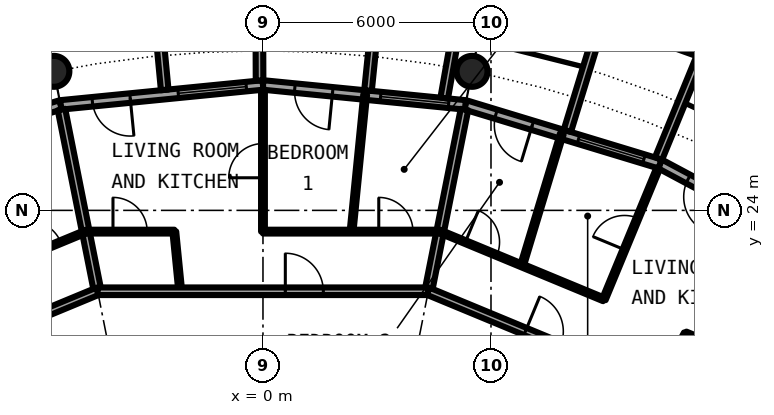
"""IFC4 building model, lengths in metres.
Left out: names, types, materials, properties, quantities, classifications, styles, units other than length and angle.
Written with IfcOpenShell. Run it as: python <this file> out.ifc"""

import sys

from ifc_helpers import new_model, si_unit, direction, frame, frame_2d, origin, origin_2d, place, context, subcontext, project, spatial, rectangle, circle, hollow_circle, extrude, element, fill, save


model = new_model("IFC4")
c1 = context("Model", 3, precision=1e-05, world=origin(), true_north=direction((0.0, 1.0)))
c2 = subcontext(c1, "Body", "Model", "MODEL_VIEW")
j1 = project(units=[si_unit("LENGTHUNIT", "METRE"), si_unit("PLANEANGLEUNIT", "RADIAN")], contexts=[c1])
p1 = place(None, origin())
s1 = spatial("IfcSite", under=j1, at=p1, CompositionType="ELEMENT")
p2 = place(p1, origin())
s2 = spatial("IfcBuilding", under=s1, at=p2, CompositionType="ELEMENT")
p3 = place(p2, frame((0.0, 0.0, 167.7)))
s3 = spatial("IfcBuildingStorey", under=s2, at=p3, CompositionType="ELEMENT", Elevation=167.7)
for number, where, z_axis, x_axis in (
    (1, (5.501, 27.658, 0.0), (0.0, 0.0, 1.0), (1.0, 0.0, 0.0)),
    (2, (-5.501, 27.658, 0.0), (0.0, 0.0, 1.0), (1.0, 0.0, 0.0)),
):
    element("IfcColumn", number, at=place(p3, frame(where, z_axis=z_axis, x_axis=x_axis)), inside=s3, PredefinedType="COLUMN", context=c2, shape_type="SweptSolid", body=[
        extrude(hollow_circle(Radius=0.406, WallThickness=0.04, at=origin_2d()), origin(), (0.0, 0.0, 1.0), 3.05),
    ])
p4 = place(p3, frame((15.167, 22.699, 0.0), z_axis=(0.0, 0.0, 1.0), x_axis=(-0.881915646801, 0.471407246368, 0.0)))
e3 = element("IfcWall", 3, at=p4, inside=s3, PredefinedType="SOLIDWALL", context=c2, shape_type="SweptSolid", body=[
    extrude(rectangle(XDim=5.352, YDim=0.25, at=frame_2d((2.676, 0.0))), origin(), (0.0, 0.0, 1.0), 2.7),
])
p5 = place(p4, frame((0.441, 0.0, 0.3)))
e4 = element("IfcOpeningElement", 4, at=p5, cuts=e3, PredefinedType="OPENING", context=c2, shape_type="SweptSolid", body=[
    extrude(rectangle(XDim=1.8, YDim=2.1, at=frame_2d((0.9, 1.05))), frame((0.0, 0.135, 0.0), z_axis=(0.0, -1.0, 0.0), x_axis=(1.0, 0.0, 0.0)), (0.0, 0.0, 1.0), 0.27),
])
p6 = place(p4, frame((3.51, 0.0, 0.0)))
e5 = element("IfcOpeningElement", 5, at=p6, cuts=e3, PredefinedType="OPENING", context=c2, shape_type="SweptSolid", body=[
    extrude(rectangle(XDim=1.0, YDim=2.2, at=frame_2d((0.5, 1.1))), frame((0.0, 0.135, 0.0), z_axis=(0.0, -1.0, 0.0), x_axis=(1.0, 0.0, 0.0)), (0.0, 0.0, 1.0), 0.27),
])
p7 = place(p3, frame((10.447, 25.222, 0.0), z_axis=(0.0, 0.0, 1.0), x_axis=(-0.956965678721, 0.290201119486, 0.0)))
e6 = element("IfcWall", 6, at=p7, inside=s3, PredefinedType="SOLIDWALL", context=c2, shape_type="SweptSolid", body=[
    extrude(rectangle(XDim=5.351, YDim=0.25, at=frame_2d((2.676, 0.0))), origin(), (0.0, 0.0, 1.0), 2.7),
])
p8 = place(p7, frame((0.441, 0.0, 0.3)))
e7 = element("IfcOpeningElement", 7, at=p8, cuts=e6, PredefinedType="OPENING", context=c2, shape_type="SweptSolid", body=[
    extrude(rectangle(XDim=1.8, YDim=2.1, at=frame_2d((0.9, 1.05))), frame((0.0, 0.135, 0.0), z_axis=(0.0, -1.0, 0.0), x_axis=(1.0, 0.0, 0.0)), (0.0, 0.0, 1.0), 0.27),
])
p9 = place(p7, frame((3.51, 0.0, 0.0)))
e8 = element("IfcOpeningElement", 8, at=p9, cuts=e6, PredefinedType="OPENING", context=c2, shape_type="SweptSolid", body=[
    extrude(rectangle(XDim=1.0, YDim=2.2, at=frame_2d((0.5, 1.1))), frame((0.0, 0.135, 0.0), z_axis=(0.0, -1.0, 0.0), x_axis=(1.0, 0.0, 0.0)), (0.0, 0.0, 1.0), 0.27),
])
p10 = place(p3, frame((11.638, 28.084, -0.03), z_axis=(0.0, 0.0, 1.0), x_axis=(-0.941461077774, 0.337121697664, 0.0)))
e9 = element("IfcWall", 9, at=p10, inside=s3, PredefinedType="SOLIDWALL", context=c2, shape_type="SweptSolid", body=[
    extrude(rectangle(XDim=2.993, YDim=0.2, at=frame_2d((1.497, 0.0))), origin(), (0.0, 0.0, 1.0), 2.73),
])
p11 = place(p10, frame((0.457, 0.0, 0.33)))
e10 = element("IfcOpeningElement", 10, at=p11, cuts=e9, PredefinedType="OPENING", context=c2, shape_type="SweptSolid", body=[
    extrude(circle(Radius=1.04, at=frame_2d((1.04, 1.04))), frame((0.0, 0.11, 0.0), z_axis=(0.0, -1.0, 0.0), x_axis=(1.0, 0.0, 0.0)), (0.0, 0.0, 1.0), 0.22),
])
p12 = place(p3, frame((10.409, 25.364, -0.03), z_axis=(0.0, 0.0, 1.0), x_axis=(0.379509886562, 0.925187681501, 0.0)))
e11 = element("IfcWall", 11, at=p12, inside=s3, PredefinedType="SOLIDWALL", context=c2, shape_type="SweptSolid", body=[
    extrude(rectangle(XDim=2.883, YDim=0.2, at=frame_2d((1.441, 0.0))), origin(), (0.0, 0.0, 1.0), 2.73),
])
p13 = place(p3, frame((8.009, 26.092, -0.03), z_axis=(0.0, 0.0, 1.0), x_axis=(0.293406695073, 0.955987715029, 0.0)))
e12 = element("IfcWall", 12, at=p13, inside=s3, PredefinedType="SOLIDWALL", context=c2, shape_type="SweptSolid", body=[
    extrude(rectangle(XDim=3.006, YDim=0.2, at=frame_2d((1.503, 0.0))), origin(), (0.0, 0.0, 1.0), 2.73),
])
p14 = place(p3, frame((5.326, 26.775, 0.0), z_axis=(0.0, 0.0, 1.0), x_axis=(-0.995173996315, 0.098126026407, 0.0)))
e13 = element("IfcWall", 13, at=p14, inside=s3, PredefinedType="SOLIDWALL", context=c2, shape_type="SweptSolid", body=[
    extrude(rectangle(XDim=5.352, YDim=0.25, at=frame_2d((2.676, 0.0))), origin(), (0.0, 0.0, 1.0), 2.7),
])
p15 = place(p14, frame((0.441, 0.0, 0.3)))
e14 = element("IfcOpeningElement", 14, at=p15, cuts=e13, PredefinedType="OPENING", context=c2, shape_type="SweptSolid", body=[
    extrude(rectangle(XDim=1.8, YDim=2.1, at=frame_2d((0.9, 1.05))), frame((0.0, 0.135, 0.0), z_axis=(0.0, -1.0, 0.0), x_axis=(1.0, 0.0, 0.0)), (0.0, 0.0, 1.0), 0.27),
])
p16 = place(p14, frame((3.51, 0.0, 0.0)))
e15 = element("IfcOpeningElement", 15, at=p16, cuts=e13, PredefinedType="OPENING", context=c2, shape_type="SweptSolid", body=[
    extrude(rectangle(XDim=1.0, YDim=2.2, at=frame_2d((0.5, 1.1))), frame((0.0, 0.135, 0.0), z_axis=(0.0, -1.0, 0.0), x_axis=(1.0, 0.0, 0.0)), (0.0, 0.0, 1.0), 0.27),
])
p17 = place(p3, frame((4.769, 26.956, -0.03), z_axis=(0.0, 0.0, 1.0), x_axis=(0.174056778901, 0.984735618183, 0.0)))
e16 = element("IfcWall", 16, at=p17, inside=s3, PredefinedType="SOLIDWALL", context=c2, shape_type="SweptSolid", body=[
    extrude(rectangle(XDim=2.925, YDim=0.2, at=frame_2d((1.462, 0.0))), origin(), (0.0, 0.0, 1.0), 2.73),
])
p18 = place(p3, frame((2.764, 27.153, -0.03), z_axis=(0.0, 0.0, 1.0), x_axis=(0.101505487237, 0.994834979311, 0.0)))
e17 = element("IfcWall", 17, at=p18, inside=s3, PredefinedType="SOLIDWALL", context=c2, shape_type="SweptSolid", body=[
    extrude(rectangle(XDim=3.007, YDim=0.2, at=frame_2d((1.503, 0.0))), origin(), (0.0, 0.0, 1.0), 2.73),
])
p19 = place(p3, frame((0.0, 27.3, 0.0), z_axis=(0.0, 0.0, 1.0), x_axis=(-0.995173996315, -0.098126026407, 0.0)))
e18 = element("IfcWall", 18, at=p19, inside=s3, PredefinedType="SOLIDWALL", context=c2, shape_type="SweptSolid", body=[
    extrude(rectangle(XDim=5.352, YDim=0.25, at=frame_2d((2.676, 0.0))), origin(), (0.0, 0.0, 1.0), 2.7),
])
p20 = place(p19, frame((0.441, 0.0, 0.3)))
e19 = element("IfcOpeningElement", 19, at=p20, cuts=e18, PredefinedType="OPENING", context=c2, shape_type="SweptSolid", body=[
    extrude(rectangle(XDim=1.8, YDim=2.1, at=frame_2d((0.9, 1.05))), frame((0.0, 0.135, 0.0), z_axis=(0.0, -1.0, 0.0), x_axis=(1.0, 0.0, 0.0)), (0.0, 0.0, 1.0), 0.27),
])
p21 = place(p19, frame((3.51, 0.0, 0.0)))
e20 = element("IfcOpeningElement", 20, at=p21, cuts=e18, PredefinedType="OPENING", context=c2, shape_type="SweptSolid", body=[
    extrude(rectangle(XDim=1.0, YDim=2.2, at=frame_2d((0.5, 1.1))), frame((0.0, 0.135, 0.0), z_axis=(0.0, -1.0, 0.0), x_axis=(1.0, 0.0, 0.0)), (0.0, 0.0, 1.0), 0.27),
])
p22 = place(p3, frame((-0.09, 27.417, -0.03), z_axis=(0.0, 0.0, 1.0), x_axis=(-0.00347308367, 0.999993968827, 0.0)))
e21 = element("IfcWall", 21, at=p22, inside=s3, PredefinedType="SOLIDWALL", context=c2, shape_type="SweptSolid", body=[
    extrude(rectangle(XDim=2.882, YDim=0.2, at=frame_2d((1.441, 0.0))), origin(), (0.0, 0.0, 1.0), 2.73),
])
p23 = place(p3, frame((-2.586, 27.171, -0.03), z_axis=(0.0, 0.0, 1.0), x_axis=(-0.094548432284, 0.995520262954, 0.0)))
e22 = element("IfcWall", 22, at=p23, inside=s3, PredefinedType="SOLIDWALL", context=c2, shape_type="SweptSolid", body=[
    extrude(rectangle(XDim=3.006, YDim=0.2, at=frame_2d((1.503, 0.0))), origin(), (0.0, 0.0, 1.0), 2.73),
])
p24 = place(p3, frame((-5.326, 26.775, 0.0), z_axis=(0.0, 0.0, 1.0), x_axis=(-0.956965678721, -0.290201119486, 0.0)))
e23 = element("IfcWall", 23, at=p24, inside=s3, PredefinedType="SOLIDWALL", context=c2, shape_type="SweptSolid", body=[
    extrude(rectangle(XDim=5.351, YDim=0.25, at=frame_2d((2.676, 0.0))), origin(), (0.0, 0.0, 1.0), 2.7),
])
p25 = place(p24, frame((0.441, 0.0, 0.3)))
e24 = element("IfcOpeningElement", 24, at=p25, cuts=e23, PredefinedType="OPENING", context=c2, shape_type="SweptSolid", body=[
    extrude(rectangle(XDim=1.8, YDim=2.1, at=frame_2d((0.9, 1.05))), frame((0.0, 0.135, 0.0), z_axis=(0.0, -1.0, 0.0), x_axis=(1.0, 0.0, 0.0)), (0.0, 0.0, 1.0), 0.27),
])
p26 = place(p24, frame((3.51, 0.0, 0.0)))
e25 = element("IfcOpeningElement", 25, at=p26, cuts=e23, PredefinedType="OPENING", context=c2, shape_type="SweptSolid", body=[
    extrude(rectangle(XDim=1.0, YDim=2.2, at=frame_2d((0.5, 1.1))), frame((0.0, 0.135, 0.0), z_axis=(0.0, -1.0, 0.0), x_axis=(1.0, 0.0, 0.0)), (0.0, 0.0, 1.0), 0.27),
])
p27 = place(p3, frame((10.38, 19.374, 0.0), z_axis=(0.0, 0.0, 1.0), x_axis=(0.472002235476, 0.881597351236, 0.0)))
e26 = element("IfcWall", 26, at=p27, inside=s3, PredefinedType="PARTITIONING", context=c2, shape_type="SweptSolid", body=[
    extrude(rectangle(XDim=1.577, YDim=0.1, at=frame_2d((0.788, 0.0))), origin(), (0.0, 0.0, 1.0), 2.7),
])
p28 = place(p3, frame((-5.302, 26.653, 0.0), z_axis=(0.0, 0.0, 1.0), x_axis=(0.195075825861, -0.980788163756, 0.0)))
e27 = element("IfcWall", 27, at=p28, inside=s3, PredefinedType="PARTITIONING", context=c2, shape_type="SweptSolid", body=[
    extrude(rectangle(XDim=4.875, YDim=0.2, at=frame_2d((2.438, 0.0))), origin(), (0.0, 0.0, 1.0), 2.7),
])
p29 = place(p3, frame((-2.333, 23.441, 0.0), z_axis=(0.0, 0.0, 1.0), x_axis=(0.098951748623, -0.995092232632, 0.0)))
e28 = element("IfcWall", 28, at=p29, inside=s3, PredefinedType="PARTITIONING", context=c2, shape_type="SweptSolid", body=[
    extrude(rectangle(XDim=1.577, YDim=0.1, at=frame_2d((0.788, 0.0))), origin(), (0.0, 0.0, 1.0), 2.7),
])
p30 = place(p3, frame((0.0, 23.441, 0.0), z_axis=(0.0, 0.0, 1.0), x_axis=(0.0, 1.0, 0.0)))
e29 = element("IfcWall", 29, at=p30, inside=s3, PredefinedType="PARTITIONING", context=c2, shape_type="SweptSolid", body=[
    extrude(rectangle(XDim=3.734, YDim=0.1, at=frame_2d((1.867, 0.0))), origin(), (0.0, 0.0, 1.0), 2.7),
])
p31 = place(p30, frame((1.417, 0.0, 0.0)))
e30 = element("IfcOpeningElement", 30, at=p31, cuts=e29, PredefinedType="OPENING", context=c2, shape_type="SweptSolid", body=[
    extrude(rectangle(XDim=0.9, YDim=2.3, at=frame_2d((0.45, 1.15))), frame((0.0, 0.06, 0.0), z_axis=(0.0, -1.0, 0.0), x_axis=(1.0, 0.0, 0.0)), (0.0, 0.0, 1.0), 0.12),
])
p32 = place(p3, frame((2.331, 23.441, 0.0), z_axis=(0.0, 0.0, 1.0), x_axis=(0.098902534616, 0.995097125233, 0.0)))
e31 = element("IfcWall", 31, at=p32, inside=s3, PredefinedType="PARTITIONING", context=c2, shape_type="SweptSolid", body=[
    extrude(rectangle(XDim=3.619, YDim=0.1, at=frame_2d((1.81, 0.0))), origin(), (0.0, 0.0, 1.0), 2.7),
])
p33 = place(p3, frame((4.351, 21.872, 0.0), z_axis=(0.0, 0.0, 1.0), x_axis=(0.195075825861, 0.980788163756, 0.0)))
e32 = element("IfcWall", 32, at=p33, inside=s3, PredefinedType="PARTITIONING", context=c2, shape_type="SweptSolid", body=[
    extrude(rectangle(XDim=4.875, YDim=0.2, at=frame_2d((2.438, 0.0))), origin(), (0.0, 0.0, 1.0), 2.7),
])
p34 = place(p3, frame((6.817, 22.549, 0.0), z_axis=(0.0, 0.0, 1.0), x_axis=(0.289439829793, 0.957196210256, 0.0)))
e33 = element("IfcWall", 33, at=p34, inside=s3, PredefinedType="PARTITIONING", context=c2, shape_type="SweptSolid", body=[
    extrude(rectangle(XDim=3.618, YDim=0.1, at=frame_2d((1.809, 0.0))), origin(), (0.0, 0.0, 1.0), 2.7),
])
p35 = place(p3, frame((8.97, 21.657, 0.0), z_axis=(0.0, 0.0, 1.0), x_axis=(0.382761856702, 0.923847044188, 0.0)))
e34 = element("IfcWall", 34, at=p35, inside=s3, PredefinedType="PARTITIONING", context=c2, shape_type="SweptSolid", body=[
    extrude(rectangle(XDim=3.733, YDim=0.1, at=frame_2d((1.867, 0.0))), origin(), (0.0, 0.0, 1.0), 2.7),
])
p36 = place(p35, frame((1.417, 0.0, 0.0)))
e35 = element("IfcOpeningElement", 35, at=p36, cuts=e34, PredefinedType="OPENING", context=c2, shape_type="SweptSolid", body=[
    extrude(rectangle(XDim=0.9, YDim=2.3, at=frame_2d((0.45, 1.15))), frame((0.0, 0.06, 0.0), z_axis=(0.0, -1.0, 0.0), x_axis=(1.0, 0.0, 0.0)), (0.0, 0.0, 1.0), 0.12),
])
p37 = place(p3, frame((-12.396, 18.536, 0.0), z_axis=(0.0, 0.0, 1.0), x_axis=(0.923722518166, 0.383062278792, 0.0)))
e36 = element("IfcWall", 36, at=p37, inside=s3, PredefinedType="PARTITIONING", context=c2, shape_type="SweptSolid", body=[
    extrude(rectangle(XDim=8.709, YDim=0.2, at=frame_2d((4.354, 0.0))), origin(), (0.0, 0.0, 1.0), 2.7),
])
p38 = place(p37, frame((2.772, 0.0, 0.0)))
e37 = element("IfcOpeningElement", 37, at=p38, cuts=e36, PredefinedType="OPENING", context=c2, shape_type="SweptSolid", body=[
    extrude(rectangle(XDim=1.0, YDim=2.3, at=frame_2d((0.5, 1.15))), frame((0.0, 0.11, 0.0), z_axis=(0.0, -1.0, 0.0), x_axis=(1.0, 0.0, 0.0)), (0.0, 0.0, 1.0), 0.22),
])
p39 = place(p3, frame((-4.351, 21.872, 0.0), z_axis=(0.0, 0.0, 1.0), x_axis=(1.0, 0.0, 0.0)))
e38 = element("IfcWall", 38, at=p39, inside=s3, PredefinedType="PARTITIONING", context=c2, shape_type="SweptSolid", body=[
    extrude(rectangle(XDim=8.702, YDim=0.2, at=frame_2d((4.351, 0.0))), origin(), (0.0, 0.0, 1.0), 2.7),
])
p40 = place(p39, frame((4.939, 0.0, 0.0)))
e39 = element("IfcOpeningElement", 39, at=p40, cuts=e38, PredefinedType="OPENING", context=c2, shape_type="SweptSolid", body=[
    extrude(rectangle(XDim=1.0, YDim=2.3, at=frame_2d((0.5, 1.15))), frame((0.0, 0.11, 0.0), z_axis=(0.0, -1.0, 0.0), x_axis=(1.0, 0.0, 0.0)), (0.0, 0.0, 1.0), 0.22),
])
p41 = place(p3, frame((4.347, 21.872, 0.0), z_axis=(0.0, 0.0, 1.0), x_axis=(0.923921124994, -0.382583003792, 0.0)))
e40 = element("IfcWall", 40, at=p41, inside=s3, PredefinedType="PARTITIONING", context=c2, shape_type="SweptSolid", body=[
    extrude(rectangle(XDim=8.704, YDim=0.2, at=frame_2d((4.352, 0.0))), origin(), (0.0, 0.0, 1.0), 2.7),
])
p42 = place(p41, frame((2.767, 0.0, 0.0)))
e41 = element("IfcOpeningElement", 41, at=p42, cuts=e40, PredefinedType="OPENING", context=c2, shape_type="SweptSolid", body=[
    extrude(rectangle(XDim=1.0, YDim=2.3, at=frame_2d((0.5, 1.15))), frame((0.0, 0.11, 0.0), z_axis=(0.0, -1.0, 0.0), x_axis=(1.0, 0.0, 0.0)), (0.0, 0.0, 1.0), 0.22),
])
p43 = place(p3, frame((-6.817, 22.548, 0.0), z_axis=(0.0, 0.0, 1.0), x_axis=(0.924061443507, 0.382243964798, 0.0)))
e42 = element("IfcWall", 42, at=p43, inside=s3, PredefinedType="PARTITIONING", context=c2, shape_type="SweptSolid", body=[
    extrude(rectangle(XDim=2.333, YDim=0.1, at=frame_2d((1.167, 0.0))), origin(), (0.0, 0.0, 1.0), 2.7),
])
p44 = place(p43, frame((0.717, 0.0, 0.0)))
e43 = element("IfcOpeningElement", 43, at=p44, cuts=e42, PredefinedType="OPENING", context=c2, shape_type="SweptSolid", body=[
    extrude(rectangle(XDim=0.9, YDim=2.3, at=frame_2d((0.45, 1.15))), frame((0.0, 0.06, 0.0), z_axis=(0.0, -1.0, 0.0), x_axis=(1.0, 0.0, 0.0)), (0.0, 0.0, 1.0), 0.12),
])
p45 = place(p3, frame((-4.663, 23.441, 0.0), z_axis=(0.0, 0.0, 1.0), x_axis=(1.0, 0.0, 0.0)))
e44 = element("IfcWall", 44, at=p45, inside=s3, PredefinedType="PARTITIONING", context=c2, shape_type="SweptSolid", body=[
    extrude(rectangle(XDim=2.332, YDim=0.1, at=frame_2d((1.166, 0.0))), origin(), (0.0, 0.0, 1.0), 2.7),
])
p46 = place(p45, frame((0.716, 0.0, 0.0)))
e45 = element("IfcOpeningElement", 45, at=p46, cuts=e44, PredefinedType="OPENING", context=c2, shape_type="SweptSolid", body=[
    extrude(rectangle(XDim=0.9, YDim=2.3, at=frame_2d((0.45, 1.15))), frame((0.0, 0.06, 0.0), z_axis=(0.0, -1.0, 0.0), x_axis=(1.0, 0.0, 0.0)), (0.0, 0.0, 1.0), 0.12),
])
p47 = place(p3, frame((0.0, 23.441, 0.0), z_axis=(0.0, 0.0, 1.0), x_axis=(1.0, 0.0, 0.0)))
e46 = element("IfcWall", 46, at=p47, inside=s3, PredefinedType="PARTITIONING", context=c2, shape_type="SweptSolid", body=[
    extrude(rectangle(XDim=4.663, YDim=0.1, at=frame_2d((2.332, 0.0))), origin(), (0.0, 0.0, 1.0), 2.7),
])
p48 = place(p47, frame((3.047, 0.0, 0.0)))
e47 = element("IfcOpeningElement", 47, at=p48, cuts=e46, PredefinedType="OPENING", context=c2, shape_type="SweptSolid", body=[
    extrude(rectangle(XDim=0.9, YDim=2.3, at=frame_2d((0.45, 1.15))), frame((0.0, 0.06, 0.0), z_axis=(0.0, -1.0, 0.0), x_axis=(1.0, 0.0, 0.0)), (0.0, 0.0, 1.0), 0.12),
])
p49 = place(p3, frame((4.66, 23.441, 0.0), z_axis=(0.0, 0.0, 1.0), x_axis=(0.923920484476, -0.38258455061, 0.0)))
e48 = element("IfcWall", 48, at=p49, inside=s3, PredefinedType="PARTITIONING", context=c2, shape_type="SweptSolid", body=[
    extrude(rectangle(XDim=4.663, YDim=0.1, at=frame_2d((2.332, 0.0))), origin(), (0.0, 0.0, 1.0), 2.7),
])
p50 = place(p49, frame((0.72, 0.0, 0.0)))
e49 = element("IfcOpeningElement", 49, at=p50, cuts=e48, PredefinedType="OPENING", context=c2, shape_type="SweptSolid", body=[
    extrude(rectangle(XDim=0.9, YDim=2.3, at=frame_2d((0.45, 1.15))), frame((0.0, 0.06, 0.0), z_axis=(0.0, -1.0, 0.0), x_axis=(1.0, 0.0, 0.0)), (0.0, 0.0, 1.0), 0.12),
])
p51 = place(p3, frame((11.124, 20.764, 0.0), z_axis=(0.0, 0.0, 1.0), x_axis=(0.923938991376, -0.382539854414, 0.0)))
e50 = element("IfcWall", 50, at=p51, inside=s3, PredefinedType="PARTITIONING", context=c2, shape_type="SweptSolid", body=[
    extrude(rectangle(XDim=2.331, YDim=0.1, at=frame_2d((1.166, 0.0))), origin(), (0.0, 0.0, 1.0), 2.7),
])
p52 = place(p51, frame((0.716, 0.0, 0.0)))
e51 = element("IfcOpeningElement", 51, at=p52, cuts=e50, PredefinedType="OPENING", context=c2, shape_type="SweptSolid", body=[
    extrude(rectangle(XDim=0.9, YDim=2.3, at=frame_2d((0.45, 1.15))), frame((0.0, 0.06, 0.0), z_axis=(0.0, -1.0, 0.0), x_axis=(1.0, 0.0, 0.0)), (0.0, 0.0, 1.0), 0.12),
])
p53 = place(p6, origin())
e52 = element("IfcDoor", 52, at=p53, inside=s3, OperationType="SINGLE_SWING_LEFT", PredefinedType="DOOR", context=c2, shape_type="SweptSolid", body=[
    extrude(rectangle(XDim=1.0, YDim=2.2, at=frame_2d((0.5, 1.1))), frame((0.0, 0.025, 0.0), z_axis=(0.0, -1.0, 0.0), x_axis=(1.0, 0.0, 0.0)), (0.0, 0.0, 1.0), 0.05),
])
fill(e5, e52)
p54 = place(p8, origin())
e53 = element("IfcWindow", 53, at=p54, inside=s3, PartitioningType="SINGLE_PANEL", PredefinedType="WINDOW", context=c2, shape_type="SweptSolid", body=[
    extrude(rectangle(XDim=1.8, YDim=2.1, at=frame_2d((0.9, 1.05))), frame((0.0, 0.03, 0.0), z_axis=(0.0, -1.0, 0.0), x_axis=(1.0, 0.0, 0.0)), (0.0, 0.0, 1.0), 0.06),
])
fill(e7, e53)
p55 = place(p9, origin())
e54 = element("IfcDoor", 54, at=p55, inside=s3, OperationType="SINGLE_SWING_LEFT", PredefinedType="DOOR", context=c2, shape_type="SweptSolid", body=[
    extrude(rectangle(XDim=1.0, YDim=2.2, at=frame_2d((0.5, 1.1))), frame((0.0, 0.025, 0.0), z_axis=(0.0, -1.0, 0.0), x_axis=(1.0, 0.0, 0.0)), (0.0, 0.0, 1.0), 0.05),
])
fill(e8, e54)
p56 = place(p15, origin())
e55 = element("IfcWindow", 55, at=p56, inside=s3, PartitioningType="SINGLE_PANEL", PredefinedType="WINDOW", context=c2, shape_type="SweptSolid", body=[
    extrude(rectangle(XDim=1.8, YDim=2.1, at=frame_2d((0.9, 1.05))), frame((0.0, 0.03, 0.0), z_axis=(0.0, -1.0, 0.0), x_axis=(1.0, 0.0, 0.0)), (0.0, 0.0, 1.0), 0.06),
])
fill(e14, e55)
p57 = place(p16, origin())
e56 = element("IfcDoor", 56, at=p57, inside=s3, OperationType="SINGLE_SWING_LEFT", PredefinedType="DOOR", context=c2, shape_type="SweptSolid", body=[
    extrude(rectangle(XDim=1.0, YDim=2.2, at=frame_2d((0.5, 1.1))), frame((0.0, 0.025, 0.0), z_axis=(0.0, -1.0, 0.0), x_axis=(1.0, 0.0, 0.0)), (0.0, 0.0, 1.0), 0.05),
])
fill(e15, e56)
p58 = place(p20, origin())
e57 = element("IfcWindow", 57, at=p58, inside=s3, PartitioningType="SINGLE_PANEL", PredefinedType="WINDOW", context=c2, shape_type="SweptSolid", body=[
    extrude(rectangle(XDim=1.8, YDim=2.1, at=frame_2d((0.9, 1.05))), frame((0.0, 0.03, 0.0), z_axis=(0.0, -1.0, 0.0), x_axis=(1.0, 0.0, 0.0)), (0.0, 0.0, 1.0), 0.06),
])
fill(e19, e57)
p59 = place(p21, origin())
e58 = element("IfcDoor", 58, at=p59, inside=s3, OperationType="SINGLE_SWING_LEFT", PredefinedType="DOOR", context=c2, shape_type="SweptSolid", body=[
    extrude(rectangle(XDim=1.0, YDim=2.2, at=frame_2d((0.5, 1.1))), frame((0.0, 0.025, 0.0), z_axis=(0.0, -1.0, 0.0), x_axis=(1.0, 0.0, 0.0)), (0.0, 0.0, 1.0), 0.05),
])
fill(e20, e58)
p60 = place(p42, origin())
e59 = element("IfcDoor", 59, at=p60, inside=s3, OperationType="SINGLE_SWING_LEFT", PredefinedType="DOOR", context=c2, shape_type="SweptSolid", body=[
    extrude(rectangle(XDim=1.0, YDim=2.3, at=frame_2d((0.5, 1.15))), frame((0.0, 0.025, 0.0), z_axis=(0.0, -1.0, 0.0), x_axis=(1.0, 0.0, 0.0)), (0.0, 0.0, 1.0), 0.05),
])
fill(e41, e59)
p61 = place(p36, origin())
e60 = element("IfcDoor", 60, at=p61, inside=s3, OperationType="SINGLE_SWING_LEFT", PredefinedType="DOOR", context=c2, shape_type="SweptSolid", body=[
    extrude(rectangle(XDim=0.9, YDim=2.3, at=frame_2d((0.45, 1.15))), frame((0.0, 0.025, 0.0), z_axis=(0.0, -1.0, 0.0), x_axis=(1.0, 0.0, 0.0)), (0.0, 0.0, 1.0), 0.05),
])
fill(e35, e60)
p62 = place(p50, origin())
e61 = element("IfcDoor", 61, at=p62, inside=s3, OperationType="SINGLE_SWING_LEFT", PredefinedType="DOOR", context=c2, shape_type="SweptSolid", body=[
    extrude(rectangle(XDim=0.9, YDim=2.3, at=frame_2d((0.45, 1.15))), frame((0.0, 0.025, 0.0), z_axis=(0.0, -1.0, 0.0), x_axis=(1.0, 0.0, 0.0)), (0.0, 0.0, 1.0), 0.05),
])
fill(e49, e61)
p63 = place(p40, origin())
e62 = element("IfcDoor", 62, at=p63, inside=s3, OperationType="SINGLE_SWING_RIGHT", PredefinedType="DOOR", context=c2, shape_type="SweptSolid", body=[
    extrude(rectangle(XDim=1.0, YDim=2.3, at=frame_2d((0.5, 1.15))), frame((0.0, 0.025, 0.0), z_axis=(0.0, -1.0, 0.0), x_axis=(1.0, 0.0, 0.0)), (0.0, 0.0, 1.0), 0.05),
])
fill(e39, e62)
p64 = place(p46, origin())
e63 = element("IfcDoor", 63, at=p64, inside=s3, OperationType="SINGLE_SWING_RIGHT", PredefinedType="DOOR", context=c2, shape_type="SweptSolid", body=[
    extrude(rectangle(XDim=0.9, YDim=2.3, at=frame_2d((0.45, 1.15))), frame((0.0, 0.025, 0.0), z_axis=(0.0, -1.0, 0.0), x_axis=(1.0, 0.0, 0.0)), (0.0, 0.0, 1.0), 0.05),
])
fill(e45, e63)
p65 = place(p31, origin())
e64 = element("IfcDoor", 64, at=p65, inside=s3, OperationType="SINGLE_SWING_RIGHT", PredefinedType="DOOR", context=c2, shape_type="SweptSolid", body=[
    extrude(rectangle(XDim=0.9, YDim=2.3, at=frame_2d((0.45, 1.15))), frame((0.0, 0.025, 0.0), z_axis=(0.0, -1.0, 0.0), x_axis=(1.0, 0.0, 0.0)), (0.0, 0.0, 1.0), 0.05),
])
fill(e30, e64)
p66 = place(p48, origin())
e65 = element("IfcDoor", 65, at=p66, inside=s3, OperationType="SINGLE_SWING_RIGHT", PredefinedType="DOOR", context=c2, shape_type="SweptSolid", body=[
    extrude(rectangle(XDim=0.9, YDim=2.3, at=frame_2d((0.45, 1.15))), frame((0.0, 0.025, 0.0), z_axis=(0.0, -1.0, 0.0), x_axis=(1.0, 0.0, 0.0)), (0.0, 0.0, 1.0), 0.05),
])
fill(e47, e65)
p67 = place(p44, origin())
e66 = element("IfcDoor", 66, at=p67, inside=s3, OperationType="SINGLE_SWING_RIGHT", PredefinedType="DOOR", context=c2, shape_type="SweptSolid", body=[
    extrude(rectangle(XDim=0.9, YDim=2.3, at=frame_2d((0.45, 1.15))), frame((0.0, 0.025, 0.0), z_axis=(0.0, -1.0, 0.0), x_axis=(1.0, 0.0, 0.0)), (0.0, 0.0, 1.0), 0.05),
])
fill(e43, e66)
save(model, sys.argv[1])
